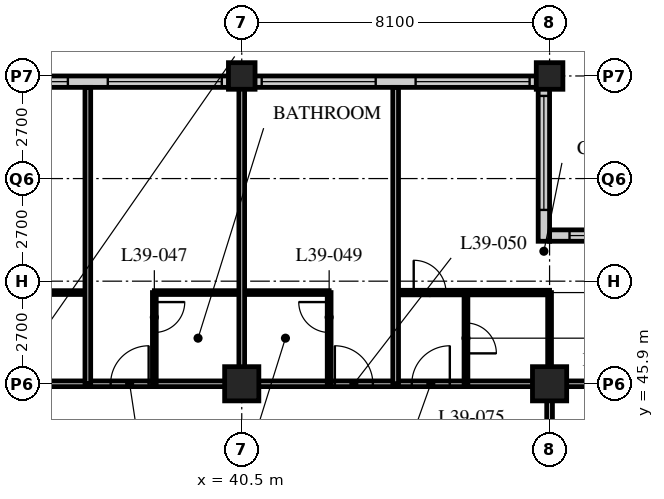
"""IFC4 building model, lengths in metres.
Left out: names, types, materials, properties, quantities, classifications, styles, units other than length and angle.
Written with IfcOpenShell. Run it as: python <this file> out.ifc"""

import sys

from ifc_helpers import new_model, si_unit, direction, frame, frame_2d, origin, origin_2d, place, context, subcontext, project, spatial, rectangle, hollow_rectangle, extrude, element, fill, save


model = new_model("IFC4")
c1 = context("Model", 3, precision=1e-05, world=origin(), true_north=direction((0.0, 1.0)))
c2 = subcontext(c1, "Body", "Model", "MODEL_VIEW")
j1 = project(units=[si_unit("LENGTHUNIT", "METRE"), si_unit("PLANEANGLEUNIT", "RADIAN")], contexts=[c1])
p1 = place(None, origin())
s1 = spatial("IfcSite", under=j1, at=p1, CompositionType="ELEMENT")
p2 = place(p1, origin())
s2 = spatial("IfcBuilding", under=s1, at=p2, CompositionType="ELEMENT")
p3 = place(p2, frame((0.0, 0.0, 151.0)))
s3 = spatial("IfcBuildingStorey", under=s2, at=p3, CompositionType="ELEMENT", Elevation=151.0)
p4 = place(p3, frame((40.5, 45.9, 0.0), z_axis=(0.0, 0.0, 1.0), x_axis=(1.0, 0.0, 0.0)))
e1 = element("IfcColumn", 1, at=p4, inside=s3, PredefinedType="COLUMN", context=c2, shape_type="SweptSolid", body=[
    extrude(hollow_rectangle(XDim=0.9, YDim=0.9, WallThickness=0.1, at=origin_2d()), origin(), (0.0, 0.0, 1.0), 3.4),
])
p5 = place(p3, frame((40.5, 54.0, 0.0), z_axis=(0.0, 0.0, 1.0), x_axis=(1.0, 0.0, 0.0)))
e2 = element("IfcColumn", 2, at=p5, inside=s3, PredefinedType="COLUMN", context=c2, shape_type="SweptSolid", body=[
    extrude(hollow_rectangle(XDim=0.7, YDim=0.7, WallThickness=0.07, at=origin_2d()), origin(), (0.0, 0.0, 1.0), 3.4),
])
p6 = place(p3, frame((48.6, 45.9, 0.0), z_axis=(0.0, 0.0, 1.0), x_axis=(1.0, 0.0, 0.0)))
e3 = element("IfcColumn", 3, at=p6, inside=s3, PredefinedType="COLUMN", context=c2, shape_type="SweptSolid", body=[
    extrude(hollow_rectangle(XDim=0.9, YDim=0.9, WallThickness=0.1, at=origin_2d()), origin(), (0.0, 0.0, 1.0), 3.4),
])
p7 = place(p3, frame((48.6, 54.0, 0.0), z_axis=(0.0, 0.0, 1.0), x_axis=(1.0, 0.0, 0.0)))
e4 = element("IfcColumn", 4, at=p7, inside=s3, PredefinedType="COLUMN", context=c2, shape_type="SweptSolid", body=[
    extrude(hollow_rectangle(XDim=0.7, YDim=0.7, WallThickness=0.07, at=origin_2d()), origin(), (0.0, 0.0, 1.0), 3.4),
])
p8 = place(p3, frame((52.35, 49.8, 0.0), z_axis=(0.0, 0.0, 1.0), x_axis=(-1.0, 0.0, 0.0)))
e5 = element("IfcWall", 5, at=p8, inside=s3, PredefinedType="SOLIDWALL", context=c2, shape_type="SweptSolid", body=[
    extrude(rectangle(XDim=3.75, YDim=0.3, at=frame_2d((1.875, 0.0))), origin(), (0.0, 0.0, 1.0), 3.19),
])
p9 = place(p8, frame((0.225, 0.0, 0.9)))
e6 = element("IfcOpeningElement", 6, at=p9, cuts=e5, PredefinedType="OPENING", context=c2, shape_type="SweptSolid", body=[
    extrude(rectangle(XDim=3.0, YDim=1.4, at=frame_2d((1.5, 0.7))), frame((0.0, 0.16, 0.0), z_axis=(0.0, -1.0, 0.0), x_axis=(1.0, 0.0, 0.0)), (0.0, 0.0, 1.0), 0.32),
])
p10 = place(p3, frame((48.45, 49.65, 0.0), z_axis=(0.0, 0.0, 1.0), x_axis=(0.0, 1.0, 0.0)))
e7 = element("IfcWall", 7, at=p10, inside=s3, PredefinedType="SOLIDWALL", context=c2, shape_type="SweptSolid", body=[
    extrude(rectangle(XDim=4.35, YDim=0.3, at=frame_2d((2.175, 0.0))), origin(), (0.0, 0.0, 1.0), 3.19),
])
p11 = place(p10, frame((0.825, 0.0, 0.9)))
e8 = element("IfcOpeningElement", 8, at=p11, cuts=e7, PredefinedType="OPENING", context=c2, shape_type="SweptSolid", body=[
    extrude(rectangle(XDim=3.0, YDim=1.4, at=frame_2d((1.5, 0.7))), frame((0.0, 0.16, 0.0), z_axis=(0.0, -1.0, 0.0), x_axis=(1.0, 0.0, 0.0)), (0.0, 0.0, 1.0), 0.32),
])
p12 = place(p3, frame((48.3, 53.85, 0.0), z_axis=(0.0, 0.0, 1.0), x_axis=(-1.0, 0.0, 0.0)))
e9 = element("IfcWall", 9, at=p12, inside=s3, PredefinedType="SOLIDWALL", context=c2, shape_type="SweptSolid", body=[
    extrude(rectangle(XDim=40.2, YDim=0.3, at=frame_2d((20.1, 0.0))), origin(), (0.0, 0.0, 1.0), 3.19),
])
p13 = place(p12, frame((0.225, 0.0, 0.9)))
e10 = element("IfcOpeningElement", 10, at=p13, cuts=e9, PredefinedType="OPENING", context=c2, shape_type="SweptSolid", body=[
    extrude(rectangle(XDim=3.0, YDim=1.4, at=frame_2d((1.5, 0.7))), frame((0.0, 0.16, 0.0), z_axis=(0.0, -1.0, 0.0), x_axis=(1.0, 0.0, 0.0)), (0.0, 0.0, 1.0), 0.32),
])
p14 = place(p12, frame((4.275, 0.0, 0.9)))
e11 = element("IfcOpeningElement", 11, at=p14, cuts=e9, PredefinedType="OPENING", context=c2, shape_type="SweptSolid", body=[
    extrude(rectangle(XDim=3.0, YDim=1.4, at=frame_2d((1.5, 0.7))), frame((0.0, 0.16, 0.0), z_axis=(0.0, -1.0, 0.0), x_axis=(1.0, 0.0, 0.0)), (0.0, 0.0, 1.0), 0.32),
])
p15 = place(p12, frame((8.325, 0.0, 0.9)))
e12 = element("IfcOpeningElement", 12, at=p15, cuts=e9, PredefinedType="OPENING", context=c2, shape_type="SweptSolid", body=[
    extrude(rectangle(XDim=3.0, YDim=1.4, at=frame_2d((1.5, 0.7))), frame((0.0, 0.16, 0.0), z_axis=(0.0, -1.0, 0.0), x_axis=(1.0, 0.0, 0.0)), (0.0, 0.0, 1.0), 0.32),
])
p16 = place(p12, frame((12.375, 0.0, 0.9)))
e13 = element("IfcOpeningElement", 13, at=p16, cuts=e9, PredefinedType="OPENING", context=c2, shape_type="SweptSolid", body=[
    extrude(rectangle(XDim=3.0, YDim=1.4, at=frame_2d((1.5, 0.7))), frame((0.0, 0.16, 0.0), z_axis=(0.0, -1.0, 0.0), x_axis=(1.0, 0.0, 0.0)), (0.0, 0.0, 1.0), 0.32),
])
p17 = place(p12, frame((16.425, 0.0, 0.9)))
e14 = element("IfcOpeningElement", 14, at=p17, cuts=e9, PredefinedType="OPENING", context=c2, shape_type="SweptSolid", body=[
    extrude(rectangle(XDim=3.0, YDim=1.4, at=frame_2d((1.5, 0.7))), frame((0.0, 0.16, 0.0), z_axis=(0.0, -1.0, 0.0), x_axis=(1.0, 0.0, 0.0)), (0.0, 0.0, 1.0), 0.32),
])
p18 = place(p12, frame((20.475, 0.0, 0.9)))
e15 = element("IfcOpeningElement", 15, at=p18, cuts=e9, PredefinedType="OPENING", context=c2, shape_type="SweptSolid", body=[
    extrude(rectangle(XDim=3.0, YDim=1.4, at=frame_2d((1.5, 0.7))), frame((0.0, 0.16, 0.0), z_axis=(0.0, -1.0, 0.0), x_axis=(1.0, 0.0, 0.0)), (0.0, 0.0, 1.0), 0.32),
])
p19 = place(p12, frame((24.525, 0.0, 0.9)))
e16 = element("IfcOpeningElement", 16, at=p19, cuts=e9, PredefinedType="OPENING", context=c2, shape_type="SweptSolid", body=[
    extrude(rectangle(XDim=3.0, YDim=1.4, at=frame_2d((1.5, 0.7))), frame((0.0, 0.16, 0.0), z_axis=(0.0, -1.0, 0.0), x_axis=(1.0, 0.0, 0.0)), (0.0, 0.0, 1.0), 0.32),
])
p20 = place(p12, frame((28.575, 0.0, 0.9)))
e17 = element("IfcOpeningElement", 17, at=p20, cuts=e9, PredefinedType="OPENING", context=c2, shape_type="SweptSolid", body=[
    extrude(rectangle(XDim=3.0, YDim=1.4, at=frame_2d((1.5, 0.7))), frame((0.0, 0.16, 0.0), z_axis=(0.0, -1.0, 0.0), x_axis=(1.0, 0.0, 0.0)), (0.0, 0.0, 1.0), 0.32),
])
p21 = place(p12, frame((32.625, 0.0, 0.9)))
e18 = element("IfcOpeningElement", 18, at=p21, cuts=e9, PredefinedType="OPENING", context=c2, shape_type="SweptSolid", body=[
    extrude(rectangle(XDim=3.0, YDim=1.4, at=frame_2d((1.5, 0.7))), frame((0.0, 0.16, 0.0), z_axis=(0.0, -1.0, 0.0), x_axis=(1.0, 0.0, 0.0)), (0.0, 0.0, 1.0), 0.32),
])
p22 = place(p12, frame((36.675, 0.0, 0.9)))
e19 = element("IfcOpeningElement", 19, at=p22, cuts=e9, PredefinedType="OPENING", context=c2, shape_type="SweptSolid", body=[
    extrude(rectangle(XDim=3.0, YDim=1.4, at=frame_2d((1.5, 0.7))), frame((0.0, 0.16, 0.0), z_axis=(0.0, -1.0, 0.0), x_axis=(1.0, 0.0, 0.0)), (0.0, 0.0, 1.0), 0.32),
])
p23 = place(p3, frame((8.1, 45.9, 0.0), z_axis=(0.0, 0.0, 1.0), x_axis=(1.0, 0.0, 0.0)))
e20 = element("IfcWall", 20, at=p23, inside=s3, PredefinedType="PARTITIONING", context=c2, shape_type="SweptSolid", body=[
    extrude(rectangle(XDim=40.5, YDim=0.15, at=frame_2d((20.25, 0.0))), origin(), (0.0, 0.0, 1.0), 2.42),
])
p24 = place(p23, frame((9.625, 0.0, 0.0)))
e21 = element("IfcOpeningElement", 21, at=p24, cuts=e20, PredefinedType="OPENING", context=c2, shape_type="SweptSolid", body=[
    extrude(rectangle(XDim=1.0, YDim=2.1, at=frame_2d((0.5, 1.05))), frame((0.0, 0.085, 0.0), z_axis=(0.0, -1.0, 0.0), x_axis=(1.0, 0.0, 0.0)), (0.0, 0.0, 1.0), 0.17),
])
p25 = place(p23, frame((21.775, 0.0, 0.0)))
e22 = element("IfcOpeningElement", 22, at=p25, cuts=e20, PredefinedType="OPENING", context=c2, shape_type="SweptSolid", body=[
    extrude(rectangle(XDim=1.0, YDim=2.1, at=frame_2d((0.5, 1.05))), frame((0.0, 0.085, 0.0), z_axis=(0.0, -1.0, 0.0), x_axis=(1.0, 0.0, 0.0)), (0.0, 0.0, 1.0), 0.17),
])
p26 = place(p23, frame((28.95, 0.0, 0.0)))
e23 = element("IfcOpeningElement", 23, at=p26, cuts=e20, PredefinedType="OPENING", context=c2, shape_type="SweptSolid", body=[
    extrude(rectangle(XDim=1.0, YDim=2.1, at=frame_2d((0.5, 1.05))), frame((0.0, 0.085, 0.0), z_axis=(0.0, -1.0, 0.0), x_axis=(1.0, 0.0, 0.0)), (0.0, 0.0, 1.0), 0.17),
])
p27 = place(p23, frame((34.85, 0.0, 0.0)))
e24 = element("IfcOpeningElement", 24, at=p27, cuts=e20, PredefinedType="OPENING", context=c2, shape_type="SweptSolid", body=[
    extrude(rectangle(XDim=1.0, YDim=2.1, at=frame_2d((0.5, 1.05))), frame((0.0, 0.085, 0.0), z_axis=(0.0, -1.0, 0.0), x_axis=(1.0, 0.0, 0.0)), (0.0, 0.0, 1.0), 0.17),
])
p28 = place(p23, frame((36.875, 0.0, 0.0)))
e25 = element("IfcOpeningElement", 25, at=p28, cuts=e20, PredefinedType="OPENING", context=c2, shape_type="SweptSolid", body=[
    extrude(rectangle(XDim=1.0, YDim=2.1, at=frame_2d((0.5, 1.05))), frame((0.0, 0.085, 0.0), z_axis=(0.0, -1.0, 0.0), x_axis=(1.0, 0.0, 0.0)), (0.0, 0.0, 1.0), 0.17),
])
p29 = place(p23, frame((2.625, 0.0, 0.0)))
e26 = element("IfcOpeningElement", 26, at=p29, cuts=e20, PredefinedType="OPENING", context=c2, shape_type="SweptSolid", body=[
    extrude(rectangle(XDim=1.0, YDim=2.1, at=frame_2d((0.5, 1.05))), frame((0.0, 0.085, 0.0), z_axis=(0.0, -1.0, 0.0), x_axis=(1.0, 0.0, 0.0)), (0.0, 0.0, 1.0), 0.17),
])
p30 = place(p3, frame((48.6, 17.55, 0.0), z_axis=(0.0, 0.0, 1.0), x_axis=(0.0, 1.0, 0.0)))
e27 = element("IfcWall", 27, at=p30, inside=s3, PredefinedType="PARTITIONING", context=c2, shape_type="SweptSolid", body=[
    extrude(rectangle(XDim=28.35, YDim=0.15, at=frame_2d((14.175, 0.0))), origin(), (0.0, 0.0, 1.0), 2.42),
])
p31 = place(p30, frame((0.3, 0.0, 0.0)))
e28 = element("IfcOpeningElement", 28, at=p31, cuts=e27, PredefinedType="OPENING", context=c2, shape_type="SweptSolid", body=[
    extrude(rectangle(XDim=1.0, YDim=2.1, at=frame_2d((0.5, 1.05))), frame((0.0, 0.085, 0.0), z_axis=(0.0, -1.0, 0.0), x_axis=(1.0, 0.0, 0.0)), (0.0, 0.0, 1.0), 0.17),
])
p32 = place(p30, frame((6.5, 0.0, 0.0)))
e29 = element("IfcOpeningElement", 29, at=p32, cuts=e27, PredefinedType="OPENING", context=c2, shape_type="SweptSolid", body=[
    extrude(rectangle(XDim=1.0, YDim=2.1, at=frame_2d((0.5, 1.05))), frame((0.0, 0.085, 0.0), z_axis=(0.0, -1.0, 0.0), x_axis=(1.0, 0.0, 0.0)), (0.0, 0.0, 1.0), 0.17),
])
p33 = place(p30, frame((13.675, 0.0, 0.0)))
e30 = element("IfcOpeningElement", 30, at=p33, cuts=e27, PredefinedType="OPENING", context=c2, shape_type="SweptSolid", body=[
    extrude(rectangle(XDim=1.0, YDim=2.1, at=frame_2d((0.5, 1.05))), frame((0.0, 0.085, 0.0), z_axis=(0.0, -1.0, 0.0), x_axis=(1.0, 0.0, 0.0)), (0.0, 0.0, 1.0), 0.17),
])
p34 = place(p30, frame((22.7, 0.0, 0.0)))
e31 = element("IfcOpeningElement", 31, at=p34, cuts=e27, PredefinedType="OPENING", context=c2, shape_type="SweptSolid", body=[
    extrude(rectangle(XDim=1.0, YDim=2.1, at=frame_2d((0.5, 1.05))), frame((0.0, 0.085, 0.0), z_axis=(0.0, -1.0, 0.0), x_axis=(1.0, 0.0, 0.0)), (0.0, 0.0, 1.0), 0.17),
])
p35 = place(p30, frame((24.9, 0.0, 0.0)))
e32 = element("IfcOpeningElement", 32, at=p35, cuts=e27, PredefinedType="OPENING", context=c2, shape_type="SweptSolid", body=[
    extrude(rectangle(XDim=1.0, YDim=2.1, at=frame_2d((0.5, 1.05))), frame((0.0, 0.085, 0.0), z_axis=(0.0, -1.0, 0.0), x_axis=(1.0, 0.0, 0.0)), (0.0, 0.0, 1.0), 0.17),
])
p36 = place(p3, frame((33.85, 48.3, 0.0), z_axis=(0.0, 0.0, 1.0), x_axis=(1.0, 0.0, 0.0)))
e33 = element("IfcWall", 33, at=p36, inside=s3, PredefinedType="PARTITIONING", context=c2, shape_type="SweptSolid", body=[
    extrude(rectangle(XDim=2.6, YDim=0.1, at=frame_2d((1.3, 0.0))), origin(), (0.0, 0.0, 1.0), 3.19),
])
p37 = place(p3, frame((36.45, 45.9, 0.0), z_axis=(0.0, 0.0, 1.0), x_axis=(0.0, 1.0, 0.0)))
e34 = element("IfcWall", 34, at=p37, inside=s3, PredefinedType="PARTITIONING", context=c2, shape_type="SweptSolid", body=[
    extrude(rectangle(XDim=7.8, YDim=0.15, at=frame_2d((3.9, 0.0))), origin(), (0.0, 0.0, 1.0), 3.19),
])
p38 = place(p3, frame((38.2, 48.3, 0.0), z_axis=(0.0, 0.0, 1.0), x_axis=(1.0, 0.0, 0.0)))
e35 = element("IfcWall", 35, at=p38, inside=s3, PredefinedType="PARTITIONING", context=c2, shape_type="SweptSolid", body=[
    extrude(rectangle(XDim=4.6, YDim=0.1, at=frame_2d((2.3, 0.0))), origin(), (0.0, 0.0, 1.0), 3.19),
])
p39 = place(p3, frame((38.2, 45.9, 0.0), z_axis=(0.0, 0.0, 1.0), x_axis=(0.0, 1.0, 0.0)))
e36 = element("IfcWall", 36, at=p39, inside=s3, PredefinedType="PARTITIONING", context=c2, shape_type="SweptSolid", body=[
    extrude(rectangle(XDim=2.4, YDim=0.1, at=frame_2d((1.2, 0.0))), origin(), (0.0, 0.0, 1.0), 3.19),
])
p40 = place(p39, frame((1.35, 0.0, 0.0)))
e37 = element("IfcOpeningElement", 37, at=p40, cuts=e36, PredefinedType="OPENING", context=c2, shape_type="SweptSolid", body=[
    extrude(rectangle(XDim=0.8, YDim=2.1, at=frame_2d((0.4, 1.05))), frame((0.0, 0.06, 0.0), z_axis=(0.0, -1.0, 0.0), x_axis=(1.0, 0.0, 0.0)), (0.0, 0.0, 1.0), 0.12),
])
p41 = place(p3, frame((40.5, 45.9, 0.0), z_axis=(0.0, 0.0, 1.0), x_axis=(0.0, 1.0, 0.0)))
e38 = element("IfcWall", 38, at=p41, inside=s3, PredefinedType="PARTITIONING", context=c2, shape_type="SweptSolid", body=[
    extrude(rectangle(XDim=7.8, YDim=0.15, at=frame_2d((3.9, 0.0))), origin(), (0.0, 0.0, 1.0), 2.42),
])
p42 = place(p3, frame((42.8, 45.9, 0.0), z_axis=(0.0, 0.0, 1.0), x_axis=(0.0, 1.0, 0.0)))
e39 = element("IfcWall", 39, at=p42, inside=s3, PredefinedType="PARTITIONING", context=c2, shape_type="SweptSolid", body=[
    extrude(rectangle(XDim=2.4, YDim=0.1, at=frame_2d((1.2, 0.0))), origin(), (0.0, 0.0, 1.0), 3.19),
])
p43 = place(p42, frame((1.35, 0.0, 0.0)))
e40 = element("IfcOpeningElement", 40, at=p43, cuts=e39, PredefinedType="OPENING", context=c2, shape_type="SweptSolid", body=[
    extrude(rectangle(XDim=0.8, YDim=2.1, at=frame_2d((0.4, 1.05))), frame((0.0, 0.06, 0.0), z_axis=(0.0, -1.0, 0.0), x_axis=(1.0, 0.0, 0.0)), (0.0, 0.0, 1.0), 0.12),
])
p44 = place(p3, frame((44.55, 48.3, 0.0), z_axis=(0.0, 0.0, 1.0), x_axis=(1.0, 0.0, 0.0)))
e41 = element("IfcWall", 41, at=p44, inside=s3, PredefinedType="PARTITIONING", context=c2, shape_type="SweptSolid", body=[
    extrude(rectangle(XDim=4.05, YDim=0.12, at=frame_2d((2.025, 0.0))), origin(), (0.0, 0.0, 1.0), 3.19),
])
p45 = place(p44, frame((0.475, 0.0, 0.0)))
e42 = element("IfcOpeningElement", 42, at=p45, cuts=e41, PredefinedType="OPENING", context=c2, shape_type="SweptSolid", body=[
    extrude(rectangle(XDim=0.85, YDim=2.1, at=frame_2d((0.425, 1.05))), frame((0.0, 0.07, 0.0), z_axis=(0.0, -1.0, 0.0), x_axis=(1.0, 0.0, 0.0)), (0.0, 0.0, 1.0), 0.14),
])
p46 = place(p3, frame((46.4, 45.9, 0.0), z_axis=(0.0, 0.0, 1.0), x_axis=(0.0, 1.0, 0.0)))
e43 = element("IfcWall", 43, at=p46, inside=s3, PredefinedType="PARTITIONING", context=c2, shape_type="SweptSolid", body=[
    extrude(rectangle(XDim=2.4, YDim=0.1, at=frame_2d((1.2, 0.0))), origin(), (0.0, 0.0, 1.0), 3.19),
])
p47 = place(p46, frame((0.8, 0.0, 0.0)))
e44 = element("IfcOpeningElement", 44, at=p47, cuts=e43, PredefinedType="OPENING", context=c2, shape_type="SweptSolid", body=[
    extrude(rectangle(XDim=0.8, YDim=2.1, at=frame_2d((0.4, 1.05))), frame((0.0, 0.06, 0.0), z_axis=(0.0, -1.0, 0.0), x_axis=(1.0, 0.0, 0.0)), (0.0, 0.0, 1.0), 0.12),
])
p48 = place(p3, frame((48.6, 45.9, 0.0), z_axis=(0.0, 0.0, 1.0), x_axis=(0.0, 1.0, 0.0)))
e45 = element("IfcWall", 45, at=p48, inside=s3, PredefinedType="PARTITIONING", context=c2, shape_type="SweptSolid", body=[
    extrude(rectangle(XDim=2.4, YDim=0.1, at=frame_2d((1.2, 0.0))), origin(), (0.0, 0.0, 1.0), 2.42),
])
p49 = place(p3, frame((48.6, 45.9, 0.0), z_axis=(0.0, 0.0, 1.0), x_axis=(1.0, 0.0, 0.0)))
e46 = element("IfcWall", 46, at=p49, inside=s3, PredefinedType="PARTITIONING", context=c2, shape_type="SweptSolid", body=[
    extrude(rectangle(XDim=3.75, YDim=0.15, at=frame_2d((1.875, 0.0))), origin(), (0.0, 0.0, 1.0), 2.42),
])
p50 = place(p3, frame((44.55, 45.9, 0.0), z_axis=(0.0, 0.0, 1.0), x_axis=(0.0, 1.0, 0.0)))
e47 = element("IfcWall", 47, at=p50, inside=s3, PredefinedType="PARTITIONING", context=c2, shape_type="SweptSolid", body=[
    extrude(rectangle(XDim=7.8, YDim=0.15, at=frame_2d((3.9, 0.0))), origin(), (0.0, 0.0, 1.0), 3.19),
])
p51 = place(p9, origin())
e48 = element("IfcWindow", 48, at=p51, inside=s3, PartitioningType="SINGLE_PANEL", PredefinedType="WINDOW", context=c2, shape_type="SweptSolid", body=[
    extrude(rectangle(XDim=3.0, YDim=1.4, at=frame_2d((1.5, 0.7))), frame((0.0, 0.03, 0.0), z_axis=(0.0, -1.0, 0.0), x_axis=(1.0, 0.0, 0.0)), (0.0, 0.0, 1.0), 0.06),
])
fill(e6, e48)
p52 = place(p11, origin())
e49 = element("IfcWindow", 49, at=p52, inside=s3, PartitioningType="SINGLE_PANEL", PredefinedType="WINDOW", context=c2, shape_type="SweptSolid", body=[
    extrude(rectangle(XDim=3.0, YDim=1.4, at=frame_2d((1.5, 0.7))), frame((0.0, 0.03, 0.0), z_axis=(0.0, -1.0, 0.0), x_axis=(1.0, 0.0, 0.0)), (0.0, 0.0, 1.0), 0.06),
])
fill(e8, e49)
p53 = place(p13, origin())
e50 = element("IfcWindow", 50, at=p53, inside=s3, PartitioningType="SINGLE_PANEL", PredefinedType="WINDOW", context=c2, shape_type="SweptSolid", body=[
    extrude(rectangle(XDim=3.0, YDim=1.4, at=frame_2d((1.5, 0.7))), frame((0.0, 0.03, 0.0), z_axis=(0.0, -1.0, 0.0), x_axis=(1.0, 0.0, 0.0)), (0.0, 0.0, 1.0), 0.06),
])
fill(e10, e50)
p54 = place(p14, origin())
e51 = element("IfcWindow", 51, at=p54, inside=s3, PartitioningType="SINGLE_PANEL", PredefinedType="WINDOW", context=c2, shape_type="SweptSolid", body=[
    extrude(rectangle(XDim=3.0, YDim=1.4, at=frame_2d((1.5, 0.7))), frame((0.0, 0.03, 0.0), z_axis=(0.0, -1.0, 0.0), x_axis=(1.0, 0.0, 0.0)), (0.0, 0.0, 1.0), 0.06),
])
fill(e11, e51)
p55 = place(p15, origin())
e52 = element("IfcWindow", 52, at=p55, inside=s3, PartitioningType="SINGLE_PANEL", PredefinedType="WINDOW", context=c2, shape_type="SweptSolid", body=[
    extrude(rectangle(XDim=3.0, YDim=1.4, at=frame_2d((1.5, 0.7))), frame((0.0, 0.03, 0.0), z_axis=(0.0, -1.0, 0.0), x_axis=(1.0, 0.0, 0.0)), (0.0, 0.0, 1.0), 0.06),
])
fill(e12, e52)
p56 = place(p16, origin())
e53 = element("IfcWindow", 53, at=p56, inside=s3, PartitioningType="SINGLE_PANEL", PredefinedType="WINDOW", context=c2, shape_type="SweptSolid", body=[
    extrude(rectangle(XDim=3.0, YDim=1.4, at=frame_2d((1.5, 0.7))), frame((0.0, 0.03, 0.0), z_axis=(0.0, -1.0, 0.0), x_axis=(1.0, 0.0, 0.0)), (0.0, 0.0, 1.0), 0.06),
])
fill(e13, e53)
p57 = place(p40, origin())
e54 = element("IfcDoor", 54, at=p57, inside=s3, OperationType="SINGLE_SWING_LEFT", PredefinedType="DOOR", context=c2, shape_type="SweptSolid", body=[
    extrude(rectangle(XDim=0.8, YDim=2.1, at=frame_2d((0.4, 1.05))), frame((0.0, 0.025, 0.0), z_axis=(0.0, -1.0, 0.0), x_axis=(1.0, 0.0, 0.0)), (0.0, 0.0, 1.0), 0.05),
])
fill(e37, e54)
p58 = place(p26, origin())
e55 = element("IfcDoor", 55, at=p58, inside=s3, OperationType="SINGLE_SWING_RIGHT", PredefinedType="DOOR", context=c2, shape_type="SweptSolid", body=[
    extrude(rectangle(XDim=1.0, YDim=2.1, at=frame_2d((0.5, 1.05))), frame((0.0, 0.025, 0.0), z_axis=(0.0, -1.0, 0.0), x_axis=(1.0, 0.0, 0.0)), (0.0, 0.0, 1.0), 0.05),
])
fill(e23, e55)
p59 = place(p43, origin())
e56 = element("IfcDoor", 56, at=p59, inside=s3, OperationType="SINGLE_SWING_RIGHT", PredefinedType="DOOR", context=c2, shape_type="SweptSolid", body=[
    extrude(rectangle(XDim=0.8, YDim=2.1, at=frame_2d((0.4, 1.05))), frame((0.0, 0.025, 0.0), z_axis=(0.0, -1.0, 0.0), x_axis=(1.0, 0.0, 0.0)), (0.0, 0.0, 1.0), 0.05),
])
fill(e40, e56)
p60 = place(p27, origin())
e57 = element("IfcDoor", 57, at=p60, inside=s3, OperationType="SINGLE_SWING_LEFT", PredefinedType="DOOR", context=c2, shape_type="SweptSolid", body=[
    extrude(rectangle(XDim=1.0, YDim=2.1, at=frame_2d((0.5, 1.05))), frame((0.0, 0.025, 0.0), z_axis=(0.0, -1.0, 0.0), x_axis=(1.0, 0.0, 0.0)), (0.0, 0.0, 1.0), 0.05),
])
fill(e24, e57)
p61 = place(p47, origin())
e58 = element("IfcDoor", 58, at=p61, inside=s3, OperationType="SINGLE_SWING_RIGHT", PredefinedType="DOOR", context=c2, shape_type="SweptSolid", body=[
    extrude(rectangle(XDim=0.8, YDim=2.1, at=frame_2d((0.4, 1.05))), frame((0.0, 0.025, 0.0), z_axis=(0.0, -1.0, 0.0), x_axis=(1.0, 0.0, 0.0)), (0.0, 0.0, 1.0), 0.05),
])
fill(e44, e58)
p62 = place(p28, origin())
e59 = element("IfcDoor", 59, at=p62, inside=s3, OperationType="SINGLE_SWING_RIGHT", PredefinedType="DOOR", context=c2, shape_type="SweptSolid", body=[
    extrude(rectangle(XDim=1.0, YDim=2.1, at=frame_2d((0.5, 1.05))), frame((0.0, 0.025, 0.0), z_axis=(0.0, -1.0, 0.0), x_axis=(1.0, 0.0, 0.0)), (0.0, 0.0, 1.0), 0.05),
])
fill(e25, e59)
p63 = place(p45, origin())
e60 = element("IfcDoor", 60, at=p63, inside=s3, OperationType="SINGLE_SWING_LEFT", PredefinedType="DOOR", context=c2, shape_type="SweptSolid", body=[
    extrude(rectangle(XDim=0.85, YDim=2.1, at=frame_2d((0.425, 1.05))), frame((0.0, 0.025, 0.0), z_axis=(0.0, -1.0, 0.0), x_axis=(1.0, 0.0, 0.0)), (0.0, 0.0, 1.0), 0.05),
])
fill(e42, e60)
save(model, sys.argv[1])
